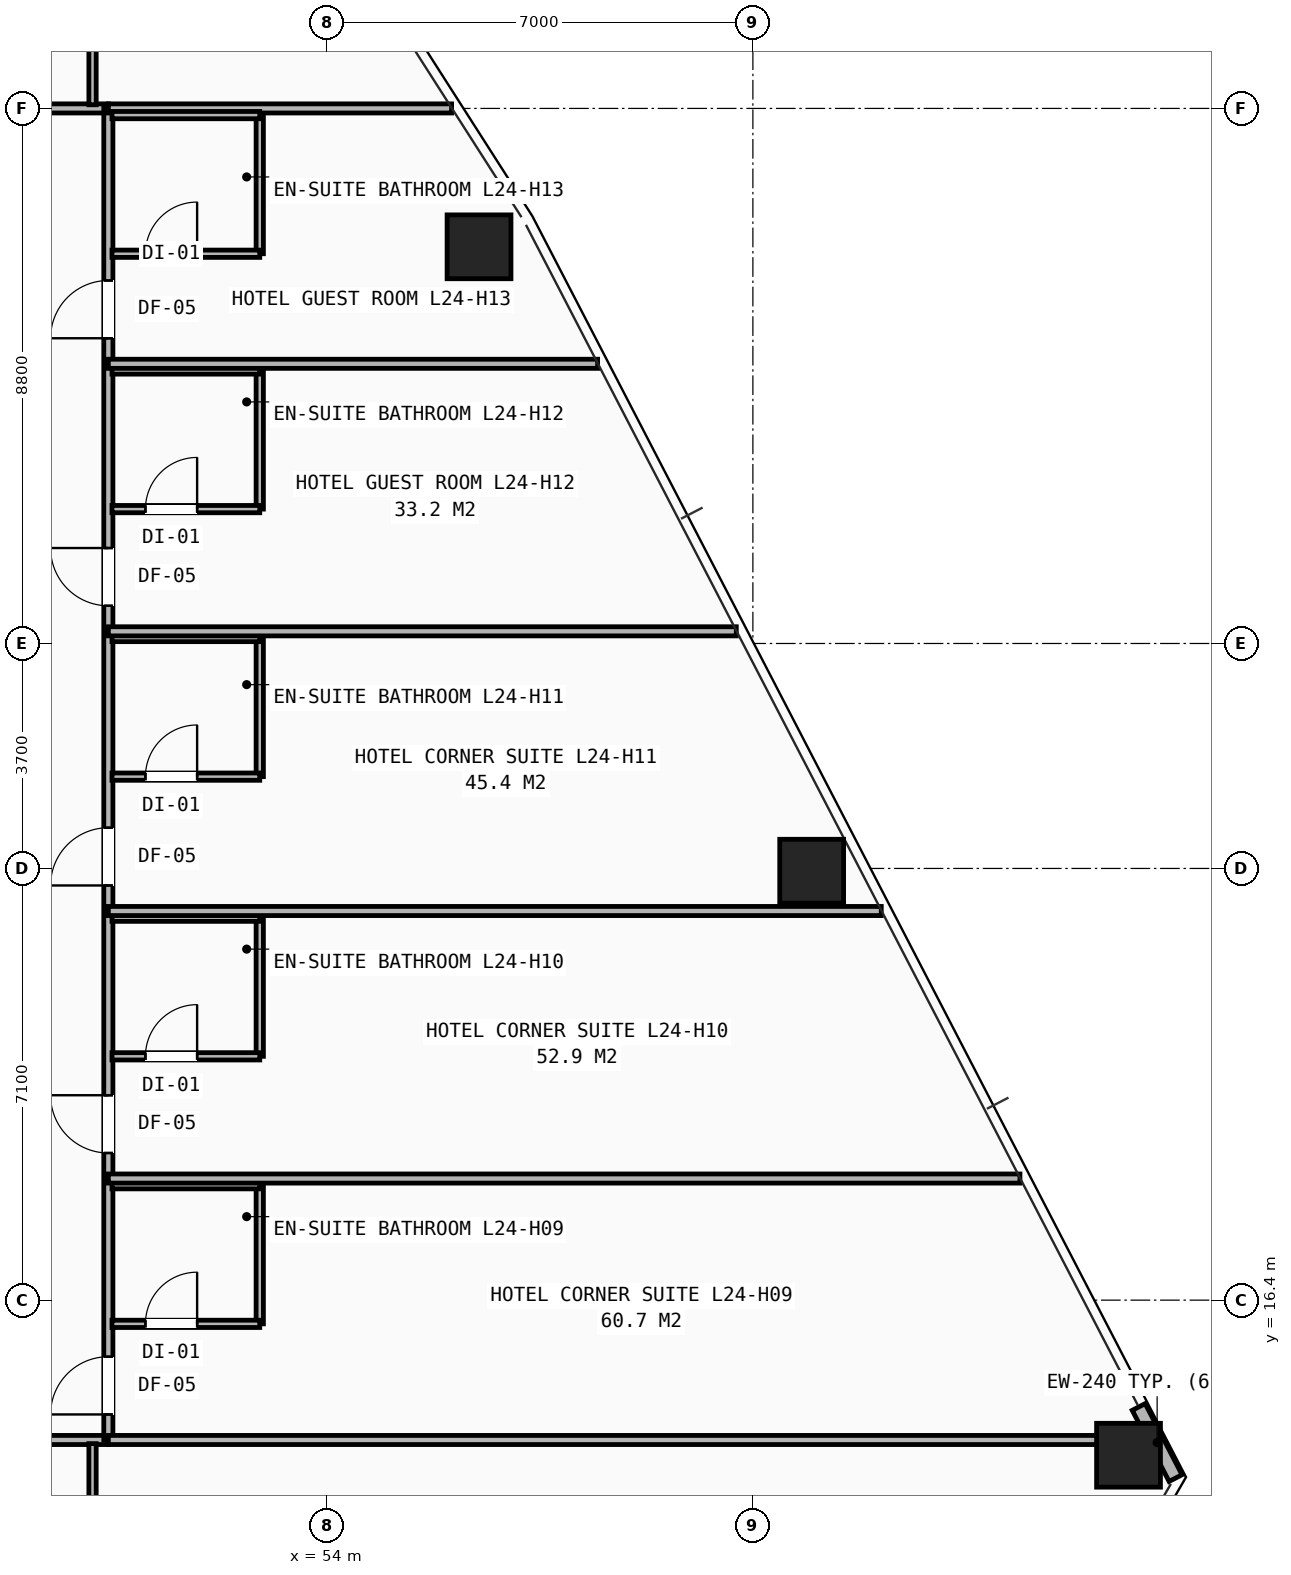
"""IFC4 building model, lengths in metres.
Left out: names, types, materials, properties, quantities, classifications, styles, units other than length and angle.
Written with IfcOpenShell. Run it as: python <this file> out.ifc"""

import sys

from ifc_helpers import new_model, si_unit, direction, frame, frame_2d, origin, origin_2d, place, context, subcontext, project, spatial, rectangle, hollow_rectangle, extrude, element, fill, save


model = new_model("IFC4")
c1 = context("Model", 3, precision=1e-05, world=origin(), true_north=direction((0.0, 1.0)))
c2 = subcontext(c1, "Body", "Model", "MODEL_VIEW")
j1 = project(units=[si_unit("LENGTHUNIT", "METRE"), si_unit("PLANEANGLEUNIT", "RADIAN")], contexts=[c1])
p1 = place(None, origin())
s1 = spatial("IfcSite", under=j1, at=p1, CompositionType="ELEMENT")
p2 = place(p1, origin())
s2 = spatial("IfcBuilding", under=s1, at=p2, CompositionType="ELEMENT")
p3 = place(p2, frame((0.0, 0.0, 86.2)))
s3 = spatial("IfcBuildingStorey", under=s2, at=p3, CompositionType="ELEMENT", Elevation=86.2)
for number, where, z_axis, x_axis in (
    (1, (67.177, 13.849, 0.0), (0.0, 0.0, 1.0), (1.0, 0.0, 0.0)),
    (2, (61.967, 23.455, 0.0), (0.0, 0.0, 1.0), (1.0, 0.0, 0.0)),
    (3, (56.496, 33.724, 0.0), (0.0, 0.0, 1.0), (1.0, 0.0, 0.0)),
):
    element("IfcColumn", number, at=place(p3, frame(where, z_axis=z_axis, x_axis=x_axis)), inside=s3, PredefinedType="COLUMN", context=c2, shape_type="SweptSolid", body=[
        extrude(hollow_rectangle(XDim=1.05, YDim=1.05, WallThickness=0.07, at=origin_2d()), origin(), (0.0, 0.0, 1.0), 3.2),
    ])
p4 = place(p3, frame((67.951, 13.473, 0.0), z_axis=(0.0, 0.0, 1.0), x_axis=(-0.460138651144, 0.887847071135, 0.0)))
e4 = element("IfcWall", 4, at=p4, inside=s3, PredefinedType="SHEAR", context=c2, shape_type="SweptSolid", body=[
    extrude(rectangle(XDim=1.317, YDim=0.24, at=frame_2d((0.659, 0.0))), origin(), (0.0, 0.0, 1.0), 2.253),
])
p5 = place(p3, frame((29.6, 14.1, 0.0), z_axis=(0.0, 0.0, 1.0), x_axis=(1.0, 0.0, 0.0)))
e5 = element("IfcWall", 5, at=p5, inside=s3, PredefinedType="PARTITIONING", context=c2, shape_type="SweptSolid", body=[
    extrude(rectangle(XDim=20.8, YDim=0.15, at=frame_2d((10.4, 0.0))), origin(), (0.0, 0.0, 1.0), 2.421),
])
p6 = place(p5, frame((0.57, 0.0, 0.0)))
e6 = element("IfcOpeningElement", 6, at=p6, cuts=e5, PredefinedType="OPENING", context=c2, shape_type="SweptSolid", body=[
    extrude(rectangle(XDim=0.95, YDim=2.1, at=frame_2d((0.475, 1.05))), frame((0.0, 0.085, 0.0), z_axis=(0.0, -1.0, 0.0), x_axis=(1.0, 0.0, 0.0)), (0.0, 0.0, 1.0), 0.17),
])
p7 = place(p5, frame((5.02, 0.0, 0.0)))
e7 = element("IfcOpeningElement", 7, at=p7, cuts=e5, PredefinedType="OPENING", context=c2, shape_type="SweptSolid", body=[
    extrude(rectangle(XDim=0.95, YDim=2.1, at=frame_2d((0.475, 1.05))), frame((0.0, 0.085, 0.0), z_axis=(0.0, -1.0, 0.0), x_axis=(1.0, 0.0, 0.0)), (0.0, 0.0, 1.0), 0.17),
])
p8 = place(p5, frame((10.62, 0.0, 0.0)))
e8 = element("IfcOpeningElement", 8, at=p8, cuts=e5, PredefinedType="OPENING", context=c2, shape_type="SweptSolid", body=[
    extrude(rectangle(XDim=0.95, YDim=2.1, at=frame_2d((0.475, 1.05))), frame((0.0, 0.085, 0.0), z_axis=(0.0, -1.0, 0.0), x_axis=(1.0, 0.0, 0.0)), (0.0, 0.0, 1.0), 0.17),
])
p9 = place(p5, frame((16.42, 0.0, 0.0)))
e9 = element("IfcOpeningElement", 9, at=p9, cuts=e5, PredefinedType="OPENING", context=c2, shape_type="SweptSolid", body=[
    extrude(rectangle(XDim=0.95, YDim=2.1, at=frame_2d((0.475, 1.05))), frame((0.0, 0.085, 0.0), z_axis=(0.0, -1.0, 0.0), x_axis=(1.0, 0.0, 0.0)), (0.0, 0.0, 1.0), 0.17),
])
p10 = place(p3, frame((40.75, 36.0, 0.0), z_axis=(0.0, 0.0, 1.0), x_axis=(1.0, 0.0, 0.0)))
e10 = element("IfcWall", 10, at=p10, inside=s3, PredefinedType="PARTITIONING", context=c2, shape_type="SweptSolid", body=[
    extrude(rectangle(XDim=9.65, YDim=0.15, at=frame_2d((4.825, 0.0))), origin(), (0.0, 0.0, 1.0), 2.503),
])
p11 = place(p10, frame((2.87, 0.0, 0.0)))
e11 = element("IfcOpeningElement", 11, at=p11, cuts=e10, PredefinedType="OPENING", context=c2, shape_type="SweptSolid", body=[
    extrude(rectangle(XDim=0.95, YDim=2.1, at=frame_2d((0.475, 1.05))), frame((0.0, 0.085, 0.0), z_axis=(0.0, -1.0, 0.0), x_axis=(1.0, 0.0, 0.0)), (0.0, 0.0, 1.0), 0.17),
])
p12 = place(p3, frame((50.4, 14.1, 0.0), z_axis=(0.0, 0.0, 1.0), x_axis=(0.0, 1.0, 0.0)))
e12 = element("IfcWall", 12, at=p12, inside=s3, PredefinedType="PARTITIONING", context=c2, shape_type="SweptSolid", body=[
    extrude(rectangle(XDim=21.9, YDim=0.15, at=frame_2d((10.95, 0.0))), origin(), (0.0, 0.0, 1.0), 2.421),
])
p13 = place(p12, frame((0.42, 0.0, 0.0)))
e13 = element("IfcOpeningElement", 13, at=p13, cuts=e12, PredefinedType="OPENING", context=c2, shape_type="SweptSolid", body=[
    extrude(rectangle(XDim=0.95, YDim=2.1, at=frame_2d((0.475, 1.05))), frame((0.0, 0.085, 0.0), z_axis=(0.0, -1.0, 0.0), x_axis=(1.0, 0.0, 0.0)), (0.0, 0.0, 1.0), 0.17),
])
p14 = place(p12, frame((4.72, 0.0, 0.0)))
e14 = element("IfcOpeningElement", 14, at=p14, cuts=e12, PredefinedType="OPENING", context=c2, shape_type="SweptSolid", body=[
    extrude(rectangle(XDim=0.95, YDim=2.1, at=frame_2d((0.475, 1.05))), frame((0.0, 0.085, 0.0), z_axis=(0.0, -1.0, 0.0), x_axis=(1.0, 0.0, 0.0)), (0.0, 0.0, 1.0), 0.17),
])
p15 = place(p12, frame((9.12, 0.0, 0.0)))
e15 = element("IfcOpeningElement", 15, at=p15, cuts=e12, PredefinedType="OPENING", context=c2, shape_type="SweptSolid", body=[
    extrude(rectangle(XDim=0.95, YDim=2.1, at=frame_2d((0.475, 1.05))), frame((0.0, 0.085, 0.0), z_axis=(0.0, -1.0, 0.0), x_axis=(1.0, 0.0, 0.0)), (0.0, 0.0, 1.0), 0.17),
])
p16 = place(p12, frame((13.72, 0.0, 0.0)))
e16 = element("IfcOpeningElement", 16, at=p16, cuts=e12, PredefinedType="OPENING", context=c2, shape_type="SweptSolid", body=[
    extrude(rectangle(XDim=0.95, YDim=2.1, at=frame_2d((0.475, 1.05))), frame((0.0, 0.085, 0.0), z_axis=(0.0, -1.0, 0.0), x_axis=(1.0, 0.0, 0.0)), (0.0, 0.0, 1.0), 0.17),
])
p17 = place(p12, frame((18.12, 0.0, 0.0)))
e17 = element("IfcOpeningElement", 17, at=p17, cuts=e12, PredefinedType="OPENING", context=c2, shape_type="SweptSolid", body=[
    extrude(rectangle(XDim=0.95, YDim=2.1, at=frame_2d((0.475, 1.05))), frame((0.0, 0.085, 0.0), z_axis=(0.0, -1.0, 0.0), x_axis=(1.0, 0.0, 0.0)), (0.0, 0.0, 1.0), 0.17),
])
p18 = place(p3, frame((50.14, 11.61, 0.0), z_axis=(0.0, 0.0, 1.0), x_axis=(0.0, 1.0, 0.0)))
e18 = element("IfcWall", 18, at=p18, inside=s3, PredefinedType="PARTITIONING", context=c2, shape_type="SweptSolid", body=[
    extrude(rectangle(XDim=2.43, YDim=0.12, at=frame_2d((1.215, 0.0))), origin(), (0.0, 0.0, 1.0), 2.97),
])
p19 = place(p3, frame((50.4, 14.1, 0.0), z_axis=(0.0, 0.0, 1.0), x_axis=(1.0, 0.0, 0.0)))
e19 = element("IfcWall", 19, at=p19, inside=s3, PredefinedType="PARTITIONING", context=c2, shape_type="SweptSolid", body=[
    extrude(rectangle(XDim=17.221, YDim=0.15, at=frame_2d((8.61, 0.0))), origin(), (0.0, 0.0, 1.0), 2.258),
])
p20 = place(p3, frame((50.4, 36.0, 0.0), z_axis=(0.0, 0.0, 1.0), x_axis=(1.0, 0.0, 0.0)))
e20 = element("IfcWall", 20, at=p20, inside=s3, PredefinedType="PARTITIONING", context=c2, shape_type="SweptSolid", body=[
    extrude(rectangle(XDim=5.645, YDim=0.15, at=frame_2d((2.823, 0.0))), origin(), (0.0, 0.0, 1.0), 2.258),
])
p21 = place(p3, frame((52.89, 16.01, 0.0), z_axis=(0.0, 0.0, 1.0), x_axis=(0.0, 1.0, 0.0)))
e21 = element("IfcWall", 21, at=p21, inside=s3, PredefinedType="PARTITIONING", context=c2, shape_type="SweptSolid", body=[
    extrude(rectangle(XDim=2.28, YDim=0.12, at=frame_2d((1.14, 0.0))), origin(), (0.0, 0.0, 1.0), 2.97),
])
p22 = place(p3, frame((50.46, 16.01, 0.0), z_axis=(0.0, 0.0, 1.0), x_axis=(1.0, 0.0, 0.0)))
e22 = element("IfcWall", 22, at=p22, inside=s3, PredefinedType="PARTITIONING", context=c2, shape_type="SweptSolid", body=[
    extrude(rectangle(XDim=2.43, YDim=0.12, at=frame_2d((1.215, 0.0))), origin(), (0.0, 0.0, 1.0), 2.97),
])
p23 = place(p22, frame((0.55, 0.0, 0.0)))
e23 = element("IfcOpeningElement", 23, at=p23, cuts=e22, PredefinedType="OPENING", context=c2, shape_type="SweptSolid", body=[
    extrude(rectangle(XDim=0.85, YDim=2.05, at=frame_2d((0.425, 1.025))), frame((0.0, 0.07, 0.0), z_axis=(0.0, -1.0, 0.0), x_axis=(1.0, 0.0, 0.0)), (0.0, 0.0, 1.0), 0.14),
])
p24 = place(p3, frame((50.46, 18.29, 0.0), z_axis=(0.0, 0.0, 1.0), x_axis=(1.0, 0.0, 0.0)))
e24 = element("IfcWall", 24, at=p24, inside=s3, PredefinedType="PARTITIONING", context=c2, shape_type="SweptSolid", body=[
    extrude(rectangle(XDim=2.43, YDim=0.12, at=frame_2d((1.215, 0.0))), origin(), (0.0, 0.0, 1.0), 2.97),
])
p25 = place(p3, frame((50.4, 18.4, 0.0), z_axis=(0.0, 0.0, 1.0), x_axis=(1.0, 0.0, 0.0)))
e25 = element("IfcWall", 25, at=p25, inside=s3, PredefinedType="PARTITIONING", context=c2, shape_type="SweptSolid", body=[
    extrude(rectangle(XDim=14.992, YDim=0.15, at=frame_2d((7.496, 0.0))), origin(), (0.0, 0.0, 1.0), 2.258),
])
p26 = place(p3, frame((52.89, 20.41, 0.0), z_axis=(0.0, 0.0, 1.0), x_axis=(0.0, 1.0, 0.0)))
e26 = element("IfcWall", 26, at=p26, inside=s3, PredefinedType="PARTITIONING", context=c2, shape_type="SweptSolid", body=[
    extrude(rectangle(XDim=2.28, YDim=0.12, at=frame_2d((1.14, 0.0))), origin(), (0.0, 0.0, 1.0), 2.97),
])
p27 = place(p3, frame((50.46, 20.41, 0.0), z_axis=(0.0, 0.0, 1.0), x_axis=(1.0, 0.0, 0.0)))
e27 = element("IfcWall", 27, at=p27, inside=s3, PredefinedType="PARTITIONING", context=c2, shape_type="SweptSolid", body=[
    extrude(rectangle(XDim=2.43, YDim=0.12, at=frame_2d((1.215, 0.0))), origin(), (0.0, 0.0, 1.0), 2.97),
])
p28 = place(p27, frame((0.55, 0.0, 0.0)))
e28 = element("IfcOpeningElement", 28, at=p28, cuts=e27, PredefinedType="OPENING", context=c2, shape_type="SweptSolid", body=[
    extrude(rectangle(XDim=0.85, YDim=2.05, at=frame_2d((0.425, 1.025))), frame((0.0, 0.07, 0.0), z_axis=(0.0, -1.0, 0.0), x_axis=(1.0, 0.0, 0.0)), (0.0, 0.0, 1.0), 0.14),
])
p29 = place(p3, frame((50.46, 22.69, 0.0), z_axis=(0.0, 0.0, 1.0), x_axis=(1.0, 0.0, 0.0)))
e29 = element("IfcWall", 29, at=p29, inside=s3, PredefinedType="PARTITIONING", context=c2, shape_type="SweptSolid", body=[
    extrude(rectangle(XDim=2.43, YDim=0.12, at=frame_2d((1.215, 0.0))), origin(), (0.0, 0.0, 1.0), 2.97),
])
p30 = place(p3, frame((50.4, 22.8, 0.0), z_axis=(0.0, 0.0, 1.0), x_axis=(1.0, 0.0, 0.0)))
e30 = element("IfcWall", 30, at=p30, inside=s3, PredefinedType="PARTITIONING", context=c2, shape_type="SweptSolid", body=[
    extrude(rectangle(XDim=12.711, YDim=0.15, at=frame_2d((6.356, 0.0))), origin(), (0.0, 0.0, 1.0), 2.258),
])
p31 = place(p3, frame((52.89, 25.01, 0.0), z_axis=(0.0, 0.0, 1.0), x_axis=(0.0, 1.0, 0.0)))
e31 = element("IfcWall", 31, at=p31, inside=s3, PredefinedType="PARTITIONING", context=c2, shape_type="SweptSolid", body=[
    extrude(rectangle(XDim=2.28, YDim=0.12, at=frame_2d((1.14, 0.0))), origin(), (0.0, 0.0, 1.0), 2.97),
])
p32 = place(p3, frame((50.46, 25.01, 0.0), z_axis=(0.0, 0.0, 1.0), x_axis=(1.0, 0.0, 0.0)))
e32 = element("IfcWall", 32, at=p32, inside=s3, PredefinedType="PARTITIONING", context=c2, shape_type="SweptSolid", body=[
    extrude(rectangle(XDim=2.43, YDim=0.12, at=frame_2d((1.215, 0.0))), origin(), (0.0, 0.0, 1.0), 2.97),
])
p33 = place(p32, frame((0.55, 0.0, 0.0)))
e33 = element("IfcOpeningElement", 33, at=p33, cuts=e32, PredefinedType="OPENING", context=c2, shape_type="SweptSolid", body=[
    extrude(rectangle(XDim=0.85, YDim=2.05, at=frame_2d((0.425, 1.025))), frame((0.0, 0.07, 0.0), z_axis=(0.0, -1.0, 0.0), x_axis=(1.0, 0.0, 0.0)), (0.0, 0.0, 1.0), 0.14),
])
p34 = place(p3, frame((50.46, 27.29, 0.0), z_axis=(0.0, 0.0, 1.0), x_axis=(1.0, 0.0, 0.0)))
e34 = element("IfcWall", 34, at=p34, inside=s3, PredefinedType="PARTITIONING", context=c2, shape_type="SweptSolid", body=[
    extrude(rectangle(XDim=2.43, YDim=0.12, at=frame_2d((1.215, 0.0))), origin(), (0.0, 0.0, 1.0), 2.97),
])
p35 = place(p3, frame((50.4, 27.4, 0.0), z_axis=(0.0, 0.0, 1.0), x_axis=(1.0, 0.0, 0.0)))
e35 = element("IfcWall", 35, at=p35, inside=s3, PredefinedType="PARTITIONING", context=c2, shape_type="SweptSolid", body=[
    extrude(rectangle(XDim=10.327, YDim=0.15, at=frame_2d((5.164, 0.0))), origin(), (0.0, 0.0, 1.0), 2.258),
])
p36 = place(p3, frame((52.89, 29.41, 0.0), z_axis=(0.0, 0.0, 1.0), x_axis=(0.0, 1.0, 0.0)))
e36 = element("IfcWall", 36, at=p36, inside=s3, PredefinedType="PARTITIONING", context=c2, shape_type="SweptSolid", body=[
    extrude(rectangle(XDim=2.28, YDim=0.12, at=frame_2d((1.14, 0.0))), origin(), (0.0, 0.0, 1.0), 2.97),
])
p37 = place(p3, frame((50.46, 29.41, 0.0), z_axis=(0.0, 0.0, 1.0), x_axis=(1.0, 0.0, 0.0)))
e37 = element("IfcWall", 37, at=p37, inside=s3, PredefinedType="PARTITIONING", context=c2, shape_type="SweptSolid", body=[
    extrude(rectangle(XDim=2.43, YDim=0.12, at=frame_2d((1.215, 0.0))), origin(), (0.0, 0.0, 1.0), 2.97),
])
p38 = place(p37, frame((0.55, 0.0, 0.0)))
e38 = element("IfcOpeningElement", 38, at=p38, cuts=e37, PredefinedType="OPENING", context=c2, shape_type="SweptSolid", body=[
    extrude(rectangle(XDim=0.85, YDim=2.05, at=frame_2d((0.425, 1.025))), frame((0.0, 0.07, 0.0), z_axis=(0.0, -1.0, 0.0), x_axis=(1.0, 0.0, 0.0)), (0.0, 0.0, 1.0), 0.14),
])
p39 = place(p3, frame((50.46, 31.69, 0.0), z_axis=(0.0, 0.0, 1.0), x_axis=(1.0, 0.0, 0.0)))
e39 = element("IfcWall", 39, at=p39, inside=s3, PredefinedType="PARTITIONING", context=c2, shape_type="SweptSolid", body=[
    extrude(rectangle(XDim=2.43, YDim=0.12, at=frame_2d((1.215, 0.0))), origin(), (0.0, 0.0, 1.0), 2.421),
])
p40 = place(p3, frame((50.4, 31.8, 0.0), z_axis=(0.0, 0.0, 1.0), x_axis=(1.0, 0.0, 0.0)))
e40 = element("IfcWall", 40, at=p40, inside=s3, PredefinedType="PARTITIONING", context=c2, shape_type="SweptSolid", body=[
    extrude(rectangle(XDim=8.046, YDim=0.15, at=frame_2d((4.023, 0.0))), origin(), (0.0, 0.0, 1.0), 2.258),
])
p41 = place(p3, frame((52.89, 33.61, 0.0), z_axis=(0.0, 0.0, 1.0), x_axis=(0.0, 1.0, 0.0)))
e41 = element("IfcWall", 41, at=p41, inside=s3, PredefinedType="PARTITIONING", context=c2, shape_type="SweptSolid", body=[
    extrude(rectangle(XDim=2.28, YDim=0.12, at=frame_2d((1.14, 0.0))), origin(), (0.0, 0.0, 1.0), 2.97),
])
p42 = place(p3, frame((50.46, 33.61, 0.0), z_axis=(0.0, 0.0, 1.0), x_axis=(1.0, 0.0, 0.0)))
e42 = element("IfcWall", 42, at=p42, inside=s3, PredefinedType="PARTITIONING", context=c2, shape_type="SweptSolid", body=[
    extrude(rectangle(XDim=2.43, YDim=0.12, at=frame_2d((1.215, 0.0))), origin(), (0.0, 0.0, 1.0), 2.503),
])
p43 = place(p42, frame((0.55, 0.0, 0.0)))
e43 = element("IfcOpeningElement", 43, at=p43, cuts=e42, PredefinedType="OPENING", context=c2, shape_type="SweptSolid", body=[
    extrude(rectangle(XDim=0.85, YDim=2.05, at=frame_2d((0.425, 1.025))), frame((0.0, 0.07, 0.0), z_axis=(0.0, -1.0, 0.0), x_axis=(1.0, 0.0, 0.0)), (0.0, 0.0, 1.0), 0.14),
])
for number, where, z_axis, x_axis in (
    (44, (50.46, 35.89, 0.0), (0.0, 0.0, 1.0), (1.0, 0.0, 0.0)),
    (45, (50.14, 36.06, 0.0), (0.0, 0.0, 1.0), (0.0, 1.0, 0.0)),
):
    element("IfcWall", number, at=place(p3, frame(where, z_axis=z_axis, x_axis=x_axis)), inside=s3, PredefinedType="PARTITIONING", context=c2, shape_type="SweptSolid", body=[
        extrude(rectangle(XDim=2.43, YDim=0.12, at=frame_2d((1.215, 0.0))), origin(), (0.0, 0.0, 1.0), 2.97),
    ])
p44 = place(p13, origin())
e46 = element("IfcDoor", 46, at=p44, inside=s3, OperationType="SINGLE_SWING_LEFT", PredefinedType="DOOR", context=c2, shape_type="SweptSolid", body=[
    extrude(rectangle(XDim=0.95, YDim=2.1, at=frame_2d((0.475, 1.05))), frame((0.0, 0.025, 0.0), z_axis=(0.0, -1.0, 0.0), x_axis=(1.0, 0.0, 0.0)), (0.0, 0.0, 1.0), 0.05),
])
fill(e13, e46)
p45 = place(p23, origin())
e47 = element("IfcDoor", 47, at=p45, inside=s3, OperationType="SINGLE_SWING_RIGHT", PredefinedType="DOOR", context=c2, shape_type="SweptSolid", body=[
    extrude(rectangle(XDim=0.85, YDim=2.05, at=frame_2d((0.425, 1.025))), frame((0.0, 0.025, 0.0), z_axis=(0.0, -1.0, 0.0), x_axis=(1.0, 0.0, 0.0)), (0.0, 0.0, 1.0), 0.05),
])
fill(e23, e47)
p46 = place(p14, origin())
e48 = element("IfcDoor", 48, at=p46, inside=s3, OperationType="SINGLE_SWING_RIGHT", PredefinedType="DOOR", context=c2, shape_type="SweptSolid", body=[
    extrude(rectangle(XDim=0.95, YDim=2.1, at=frame_2d((0.475, 1.05))), frame((0.0, 0.025, 0.0), z_axis=(0.0, -1.0, 0.0), x_axis=(1.0, 0.0, 0.0)), (0.0, 0.0, 1.0), 0.05),
])
fill(e14, e48)
p47 = place(p28, origin())
e49 = element("IfcDoor", 49, at=p47, inside=s3, OperationType="SINGLE_SWING_RIGHT", PredefinedType="DOOR", context=c2, shape_type="SweptSolid", body=[
    extrude(rectangle(XDim=0.85, YDim=2.05, at=frame_2d((0.425, 1.025))), frame((0.0, 0.025, 0.0), z_axis=(0.0, -1.0, 0.0), x_axis=(1.0, 0.0, 0.0)), (0.0, 0.0, 1.0), 0.05),
])
fill(e28, e49)
p48 = place(p15, origin())
e50 = element("IfcDoor", 50, at=p48, inside=s3, OperationType="SINGLE_SWING_LEFT", PredefinedType="DOOR", context=c2, shape_type="SweptSolid", body=[
    extrude(rectangle(XDim=0.95, YDim=2.1, at=frame_2d((0.475, 1.05))), frame((0.0, 0.025, 0.0), z_axis=(0.0, -1.0, 0.0), x_axis=(1.0, 0.0, 0.0)), (0.0, 0.0, 1.0), 0.05),
])
fill(e15, e50)
p49 = place(p33, origin())
e51 = element("IfcDoor", 51, at=p49, inside=s3, OperationType="SINGLE_SWING_RIGHT", PredefinedType="DOOR", context=c2, shape_type="SweptSolid", body=[
    extrude(rectangle(XDim=0.85, YDim=2.05, at=frame_2d((0.425, 1.025))), frame((0.0, 0.025, 0.0), z_axis=(0.0, -1.0, 0.0), x_axis=(1.0, 0.0, 0.0)), (0.0, 0.0, 1.0), 0.05),
])
fill(e33, e51)
p50 = place(p16, origin())
e52 = element("IfcDoor", 52, at=p50, inside=s3, OperationType="SINGLE_SWING_RIGHT", PredefinedType="DOOR", context=c2, shape_type="SweptSolid", body=[
    extrude(rectangle(XDim=0.95, YDim=2.1, at=frame_2d((0.475, 1.05))), frame((0.0, 0.025, 0.0), z_axis=(0.0, -1.0, 0.0), x_axis=(1.0, 0.0, 0.0)), (0.0, 0.0, 1.0), 0.05),
])
fill(e16, e52)
p51 = place(p38, origin())
e53 = element("IfcDoor", 53, at=p51, inside=s3, OperationType="SINGLE_SWING_RIGHT", PredefinedType="DOOR", context=c2, shape_type="SweptSolid", body=[
    extrude(rectangle(XDim=0.85, YDim=2.05, at=frame_2d((0.425, 1.025))), frame((0.0, 0.025, 0.0), z_axis=(0.0, -1.0, 0.0), x_axis=(1.0, 0.0, 0.0)), (0.0, 0.0, 1.0), 0.05),
])
fill(e38, e53)
p52 = place(p17, origin())
e54 = element("IfcDoor", 54, at=p52, inside=s3, OperationType="SINGLE_SWING_LEFT", PredefinedType="DOOR", context=c2, shape_type="SweptSolid", body=[
    extrude(rectangle(XDim=0.95, YDim=2.1, at=frame_2d((0.475, 1.05))), frame((0.0, 0.025, 0.0), z_axis=(0.0, -1.0, 0.0), x_axis=(1.0, 0.0, 0.0)), (0.0, 0.0, 1.0), 0.05),
])
fill(e17, e54)
p53 = place(p43, origin())
e55 = element("IfcDoor", 55, at=p53, inside=s3, OperationType="SINGLE_SWING_RIGHT", PredefinedType="DOOR", context=c2, shape_type="SweptSolid", body=[
    extrude(rectangle(XDim=0.85, YDim=2.05, at=frame_2d((0.425, 1.025))), frame((0.0, 0.025, 0.0), z_axis=(0.0, -1.0, 0.0), x_axis=(1.0, 0.0, 0.0)), (0.0, 0.0, 1.0), 0.05),
])
fill(e43, e55)
save(model, sys.argv[1])
